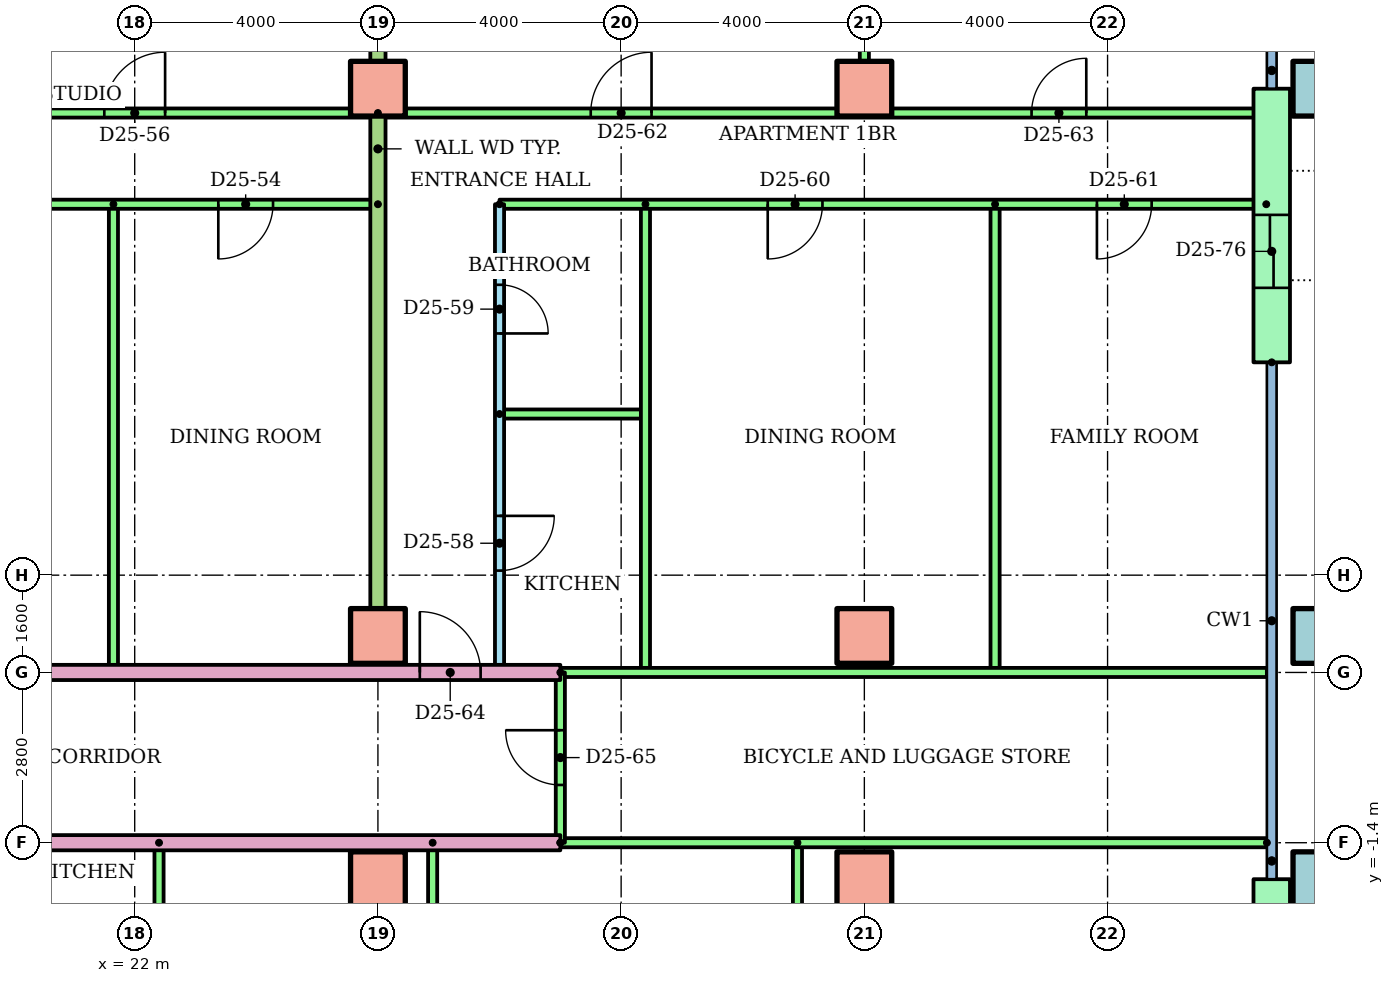
"""IFC4 building model, lengths in metres.
Left out: names, types, materials, properties, quantities, classifications, styles, units other than length and angle.
Written with IfcOpenShell. Run it as: python <this file> out.ifc"""

import sys

from ifc_helpers import new_model, si_unit, direction, frame, frame_2d, origin, origin_2d, place, context, subcontext, project, spatial, rectangle, hollow_rectangle, extrude, element, fill, save


model = new_model("IFC4")
c1 = context("Model", 3, precision=1e-05, world=origin(), true_north=direction((0.0, 1.0)))
c2 = subcontext(c1, "Body", "Model", "MODEL_VIEW")
j1 = project(units=[si_unit("LENGTHUNIT", "METRE"), si_unit("PLANEANGLEUNIT", "RADIAN")], contexts=[c1])
p1 = place(None, origin())
s1 = spatial("IfcSite", under=j1, at=p1, CompositionType="ELEMENT")
p2 = place(p1, origin())
s2 = spatial("IfcBuilding", under=s1, at=p2, CompositionType="ELEMENT")
p3 = place(p2, frame((0.0, 0.0, 96.7)))
s3 = spatial("IfcBuildingStorey", under=s2, at=p3, CompositionType="ELEMENT", Elevation=96.7)
for number, where in (
    (1, (26.0, -2.0, 0.0)),
    (2, (34.0, -2.0, 0.0)),
):
    element("IfcColumn", number, at=place(p3, frame(where)), inside=s3, PredefinedType="COLUMN", context=c2, shape_type="SweptSolid", body=[
        extrude(rectangle(XDim=0.9, YDim=0.9, at=origin_2d()), origin(), (0.0, 0.0, 1.0), 3.2),
    ])
p4 = place(p3, frame((41.5, -2.0, 0.0)))
e3 = element("IfcColumn", 3, at=p4, inside=s3, PredefinedType="COLUMN", context=c2, shape_type="SweptSolid", body=[
    extrude(hollow_rectangle(XDim=0.9, YDim=0.9, WallThickness=0.045, at=origin_2d()), origin(), (0.0, 0.0, 1.0), 3.2),
])
for number, where in (
    (4, (26.0, 2.0, 0.0)),
    (5, (34.0, 2.0, 0.0)),
):
    element("IfcColumn", number, at=place(p3, frame(where)), inside=s3, PredefinedType="COLUMN", context=c2, shape_type="SweptSolid", body=[
        extrude(rectangle(XDim=0.9, YDim=0.9, at=origin_2d()), origin(), (0.0, 0.0, 1.0), 3.2),
    ])
p5 = place(p3, frame((41.5, 2.0, 0.0)))
e6 = element("IfcColumn", 6, at=p5, inside=s3, PredefinedType="COLUMN", context=c2, shape_type="SweptSolid", body=[
    extrude(hollow_rectangle(XDim=0.9, YDim=0.9, WallThickness=0.045, at=origin_2d()), origin(), (0.0, 0.0, 1.0), 3.2),
])
for number, where in (
    (7, (26.0, 11.0, 0.0)),
    (8, (34.0, 11.0, 0.0)),
):
    element("IfcColumn", number, at=place(p3, frame(where)), inside=s3, PredefinedType="COLUMN", context=c2, shape_type="SweptSolid", body=[
        extrude(rectangle(XDim=0.9, YDim=0.9, at=origin_2d()), origin(), (0.0, 0.0, 1.0), 3.2),
    ])
p6 = place(p3, frame((41.5, 11.0, 0.0)))
e9 = element("IfcColumn", 9, at=p6, inside=s3, PredefinedType="COLUMN", context=c2, shape_type="SweptSolid", body=[
    extrude(hollow_rectangle(XDim=0.9, YDim=0.9, WallThickness=0.045, at=origin_2d()), origin(), (0.0, 0.0, 1.0), 3.2),
])
p7 = place(p3, frame((40.7, -5.7, 0.0), z_axis=(0.0, 0.0, 1.0), x_axis=(0.0, 1.0, 0.0)))
e10 = element("IfcWall", 10, at=p7, inside=s3, PredefinedType="STANDARD", context=c2, shape_type="SweptSolid", body=[
    extrude(rectangle(XDim=3.7, YDim=0.6, at=frame_2d((1.85, 0.0))), origin(), (0.0, 0.0, 1.0), 2.92),
])
p8 = place(p7, frame((1.25, 0.0, 0.0)))
e11 = element("IfcOpeningElement", 11, at=p8, cuts=e10, PredefinedType="OPENING", context=c2, shape_type="SweptSolid", body=[
    extrude(rectangle(XDim=1.2, YDim=2.1, at=frame_2d((0.6, 1.05))), frame((0.0, 0.31, 0.0), z_axis=(0.0, -1.0, 0.0), x_axis=(1.0, 0.0, 0.0)), (0.0, 0.0, 1.0), 0.62),
])
p9 = place(p3, frame((40.7, 6.5, 0.0), z_axis=(0.0, 0.0, 1.0), x_axis=(0.0, 1.0, 0.0)))
e12 = element("IfcWall", 12, at=p9, inside=s3, PredefinedType="STANDARD", context=c2, shape_type="SweptSolid", body=[
    extrude(rectangle(XDim=4.5, YDim=0.6, at=frame_2d((2.25, 0.0))), origin(), (0.0, 0.0, 1.0), 2.92),
])
p10 = place(p9, frame((1.225, 0.0, 0.0)))
e13 = element("IfcOpeningElement", 13, at=p10, cuts=e12, PredefinedType="OPENING", context=c2, shape_type="SweptSolid", body=[
    extrude(rectangle(XDim=1.2, YDim=2.1, at=frame_2d((0.6, 1.05))), frame((0.0, 0.31, 0.0), z_axis=(0.0, -1.0, 0.0), x_axis=(1.0, 0.0, 0.0)), (0.0, 0.0, 1.0), 0.62),
])
for number, where, z_axis, x_axis in (
    (14, (22.4, -1.4, 0.0), (0.0, 0.0, 1.0), (0.0, -1.0, 0.0)),
    (15, (26.9, -1.4, 0.0), (0.0, 0.0, 1.0), (0.0, -1.0, 0.0)),
    (16, (32.9, -1.4, 0.0), (0.0, 0.0, 1.0), (0.0, -1.0, 0.0)),
):
    element("IfcWall", number, at=place(p3, frame(where, z_axis=z_axis, x_axis=x_axis)), inside=s3, PredefinedType="PARTITIONING", context=c2, shape_type="SweptSolid", body=[
        extrude(rectangle(XDim=5.3, YDim=0.15, at=frame_2d((2.65, 0.0))), origin(), (0.0, 0.0, 1.0), 2.4),
    ])
p11 = place(p3, frame((29.0, -1.4, 0.0), z_axis=(0.0, 0.0, 1.0), x_axis=(-1.0, 0.0, 0.0)))
e17 = element("IfcWall", 17, at=p11, inside=s3, PredefinedType="PARTITIONING", context=c2, shape_type="SweptSolid", body=[
    extrude(rectangle(XDim=15.0, YDim=0.25, at=frame_2d((7.5, 0.0))), origin(), (0.0, 0.0, 1.0), 2.4),
])
p12 = place(p11, frame((9.311, 0.0, 0.0)))
e18 = element("IfcOpeningElement", 18, at=p12, cuts=e17, PredefinedType="OPENING", context=c2, shape_type="SweptSolid", body=[
    extrude(rectangle(XDim=1.0, YDim=2.1, at=frame_2d((0.5, 1.05))), frame((0.0, 0.135, 0.0), z_axis=(0.0, -1.0, 0.0), x_axis=(1.0, 0.0, 0.0)), (0.0, 0.0, 1.0), 0.27),
])
p13 = place(p3, frame((40.62, -1.4, 0.0), z_axis=(0.0, 0.0, 1.0), x_axis=(-1.0, 0.0, 0.0)))
e19 = element("IfcWall", 19, at=p13, inside=s3, PredefinedType="PARTITIONING", context=c2, shape_type="SweptSolid", body=[
    extrude(rectangle(XDim=11.62, YDim=0.15, at=frame_2d((5.81, 0.0))), origin(), (0.0, 0.0, 1.0), 2.4),
])
p14 = place(p3, frame((21.65, 9.1, 0.0), z_axis=(0.0, 0.0, 1.0), x_axis=(0.0, -1.0, 0.0)))
e20 = element("IfcWall", 20, at=p14, inside=s3, PredefinedType="PARTITIONING", context=c2, shape_type="SweptSolid", body=[
    extrude(rectangle(XDim=7.7, YDim=0.15, at=frame_2d((3.85, 0.0))), origin(), (0.0, 0.0, 1.0), 2.4),
])
p15 = place(p3, frame((26.0, 9.1, 0.0), z_axis=(0.0, 0.0, 1.0), x_axis=(-1.0, 0.0, 0.0)))
e21 = element("IfcWall", 21, at=p15, inside=s3, PredefinedType="PARTITIONING", context=c2, shape_type="SweptSolid", body=[
    extrude(rectangle(XDim=10.0, YDim=0.15, at=frame_2d((5.0, 0.0))), origin(), (0.0, 0.0, 1.0), 2.4),
])
p16 = place(p15, frame((5.525, 0.0, 0.0)))
e22 = element("IfcOpeningElement", 22, at=p16, cuts=e21, PredefinedType="OPENING", context=c2, shape_type="SweptSolid", body=[
    extrude(rectangle(XDim=0.9, YDim=2.1, at=frame_2d((0.45, 1.05))), frame((0.0, 0.085, 0.0), z_axis=(0.0, -1.0, 0.0), x_axis=(1.0, 0.0, 0.0)), (0.0, 0.0, 1.0), 0.17),
])
p17 = place(p15, frame((1.725, 0.0, 0.0)))
e23 = element("IfcOpeningElement", 23, at=p17, cuts=e21, PredefinedType="OPENING", context=c2, shape_type="SweptSolid", body=[
    extrude(rectangle(XDim=0.9, YDim=2.1, at=frame_2d((0.45, 1.05))), frame((0.0, 0.085, 0.0), z_axis=(0.0, -1.0, 0.0), x_axis=(1.0, 0.0, 0.0)), (0.0, 0.0, 1.0), 0.17),
])
p18 = place(p3, frame((14.0, 10.6, 0.0)))
e24 = element("IfcWall", 24, at=p18, inside=s3, PredefinedType="PARTITIONING", context=c2, shape_type="SweptSolid", body=[
    extrude(rectangle(XDim=12.0, YDim=0.15, at=frame_2d((6.0, 0.0))), origin(), (0.0, 0.0, 1.0), 2.4),
])
p19 = place(p18, frame((1.5, 0.0, 0.0)))
e25 = element("IfcOpeningElement", 25, at=p19, cuts=e24, PredefinedType="OPENING", context=c2, shape_type="SweptSolid", body=[
    extrude(rectangle(XDim=1.0, YDim=2.1, at=frame_2d((0.5, 1.05))), frame((0.0, 0.085, 0.0), z_axis=(0.0, -1.0, 0.0), x_axis=(1.0, 0.0, 0.0)), (0.0, 0.0, 1.0), 0.17),
])
p20 = place(p18, frame((7.5, 0.0, 0.0)))
e26 = element("IfcOpeningElement", 26, at=p20, cuts=e24, PredefinedType="OPENING", context=c2, shape_type="SweptSolid", body=[
    extrude(rectangle(XDim=1.0, YDim=2.1, at=frame_2d((0.5, 1.05))), frame((0.0, 0.085, 0.0), z_axis=(0.0, -1.0, 0.0), x_axis=(1.0, 0.0, 0.0)), (0.0, 0.0, 1.0), 0.17),
])
p21 = place(p3, frame((28.0, 9.1, 0.0), z_axis=(0.0, 0.0, 1.0), x_axis=(0.0, -1.0, 0.0)))
e27 = element("IfcWall", 27, at=p21, inside=s3, PredefinedType="PARTITIONING", context=c2, shape_type="SweptSolid", body=[
    extrude(rectangle(XDim=7.7, YDim=0.15, at=frame_2d((3.85, 0.0))), origin(), (0.0, 0.0, 1.0), 2.4),
])
p22 = place(p21, frame((5.125, 0.0, 0.0)))
e28 = element("IfcOpeningElement", 28, at=p22, cuts=e27, PredefinedType="OPENING", context=c2, shape_type="SweptSolid", body=[
    extrude(rectangle(XDim=0.9, YDim=2.1, at=frame_2d((0.45, 1.05))), frame((0.0, 0.085, 0.0), z_axis=(0.0, -1.0, 0.0), x_axis=(1.0, 0.0, 0.0)), (0.0, 0.0, 1.0), 0.17),
])
p23 = place(p21, frame((1.325, 0.0, 0.0)))
e29 = element("IfcOpeningElement", 29, at=p23, cuts=e27, PredefinedType="OPENING", context=c2, shape_type="SweptSolid", body=[
    extrude(rectangle(XDim=0.8, YDim=2.1, at=frame_2d((0.4, 1.05))), frame((0.0, 0.085, 0.0), z_axis=(0.0, -1.0, 0.0), x_axis=(1.0, 0.0, 0.0)), (0.0, 0.0, 1.0), 0.17),
])
p24 = place(p3, frame((28.0, 5.65, 0.0)))
e30 = element("IfcWall", 30, at=p24, inside=s3, PredefinedType="PARTITIONING", context=c2, shape_type="SweptSolid", body=[
    extrude(rectangle(XDim=2.4, YDim=0.15, at=frame_2d((1.2, 0.0))), origin(), (0.0, 0.0, 1.0), 2.4),
])
for number, where, z_axis, x_axis in (
    (31, (30.4, 9.1, 0.0), (0.0, 0.0, 1.0), (0.0, -1.0, 0.0)),
    (32, (36.15, 9.1, 0.0), (0.0, 0.0, 1.0), (0.0, -1.0, 0.0)),
):
    element("IfcWall", number, at=place(p3, frame(where, z_axis=z_axis, x_axis=x_axis)), inside=s3, PredefinedType="PARTITIONING", context=c2, shape_type="SweptSolid", body=[
        extrude(rectangle(XDim=7.7, YDim=0.15, at=frame_2d((3.85, 0.0))), origin(), (0.0, 0.0, 1.0), 2.4),
    ])
p25 = place(p3, frame((40.61, 9.1, 0.0), z_axis=(0.0, 0.0, 1.0), x_axis=(-1.0, 0.0, 0.0)))
e33 = element("IfcWall", 33, at=p25, inside=s3, PredefinedType="PARTITIONING", context=c2, shape_type="SweptSolid", body=[
    extrude(rectangle(XDim=12.61, YDim=0.15, at=frame_2d((6.305, 0.0))), origin(), (0.0, 0.0, 1.0), 2.4),
])
p26 = place(p25, frame((7.299, 0.0, 0.0)))
e34 = element("IfcOpeningElement", 34, at=p26, cuts=e33, PredefinedType="OPENING", context=c2, shape_type="SweptSolid", body=[
    extrude(rectangle(XDim=0.9, YDim=2.1, at=frame_2d((0.45, 1.05))), frame((0.0, 0.085, 0.0), z_axis=(0.0, -1.0, 0.0), x_axis=(1.0, 0.0, 0.0)), (0.0, 0.0, 1.0), 0.17),
])
p27 = place(p25, frame((1.885, 0.0, 0.0)))
e35 = element("IfcOpeningElement", 35, at=p27, cuts=e33, PredefinedType="OPENING", context=c2, shape_type="SweptSolid", body=[
    extrude(rectangle(XDim=0.9, YDim=2.1, at=frame_2d((0.45, 1.05))), frame((0.0, 0.085, 0.0), z_axis=(0.0, -1.0, 0.0), x_axis=(1.0, 0.0, 0.0)), (0.0, 0.0, 1.0), 0.17),
])
p28 = place(p3, frame((26.0, 10.6, 0.0)))
e36 = element("IfcWall", 36, at=p28, inside=s3, PredefinedType="PARTITIONING", context=c2, shape_type="SweptSolid", body=[
    extrude(rectangle(XDim=14.61, YDim=0.15, at=frame_2d((7.305, 0.0))), origin(), (0.0, 0.0, 1.0), 2.4),
])
p29 = place(p28, frame((3.5, 0.0, 0.0)))
e37 = element("IfcOpeningElement", 37, at=p29, cuts=e36, PredefinedType="OPENING", context=c2, shape_type="SweptSolid", body=[
    extrude(rectangle(XDim=1.0, YDim=2.1, at=frame_2d((0.5, 1.05))), frame((0.0, 0.085, 0.0), z_axis=(0.0, -1.0, 0.0), x_axis=(1.0, 0.0, 0.0)), (0.0, 0.0, 1.0), 0.17),
])
p30 = place(p28, frame((10.75, 0.0, 0.0)))
e38 = element("IfcOpeningElement", 38, at=p30, cuts=e36, PredefinedType="OPENING", context=c2, shape_type="SweptSolid", body=[
    extrude(rectangle(XDim=0.9, YDim=2.1, at=frame_2d((0.45, 1.05))), frame((0.0, 0.085, 0.0), z_axis=(0.0, -1.0, 0.0), x_axis=(1.0, 0.0, 0.0)), (0.0, 0.0, 1.0), 0.17),
])
p31 = place(p3, frame((34.0, 18.621, 0.0), z_axis=(0.0, 0.0, 1.0), x_axis=(0.0, -1.0, 0.0)))
e39 = element("IfcWall", 39, at=p31, inside=s3, PredefinedType="PARTITIONING", context=c2, shape_type="SweptSolid", body=[
    extrude(rectangle(XDim=8.021, YDim=0.15, at=frame_2d((4.01, 0.0))), origin(), (0.0, 0.0, 1.0), 2.4),
])
p32 = place(p3, frame((26.0, 18.621, 0.0), z_axis=(0.0, 0.0, 1.0), x_axis=(0.0, -1.0, 0.0)))
e40 = element("IfcWall", 40, at=p32, inside=s3, PredefinedType="PARTITIONING", context=c2, shape_type="SweptSolid", body=[
    extrude(rectangle(XDim=17.221, YDim=0.25, at=frame_2d((8.611, 0.0))), origin(), (0.0, 0.0, 1.0), 2.4),
])
p33 = place(p3, frame((14.0, 1.4, 0.0)))
e41 = element("IfcWall", 41, at=p33, inside=s3, PredefinedType="PARTITIONING", context=c2, shape_type="SweptSolid", body=[
    extrude(rectangle(XDim=15.0, YDim=0.25, at=frame_2d((7.5, 0.0))), origin(), (0.0, 0.0, 1.0), 2.4),
])
p34 = place(p33, frame((0.5, 0.0, 0.0)))
e42 = element("IfcOpeningElement", 42, at=p34, cuts=e41, PredefinedType="OPENING", context=c2, shape_type="SweptSolid", body=[
    extrude(rectangle(XDim=1.0, YDim=2.1, at=frame_2d((0.5, 1.05))), frame((0.0, 0.135, 0.0), z_axis=(0.0, -1.0, 0.0), x_axis=(1.0, 0.0, 0.0)), (0.0, 0.0, 1.0), 0.27),
])
p35 = place(p33, frame((12.689, 0.0, 0.0)))
e43 = element("IfcOpeningElement", 43, at=p35, cuts=e41, PredefinedType="OPENING", context=c2, shape_type="SweptSolid", body=[
    extrude(rectangle(XDim=1.0, YDim=2.1, at=frame_2d((0.5, 1.05))), frame((0.0, 0.135, 0.0), z_axis=(0.0, -1.0, 0.0), x_axis=(1.0, 0.0, 0.0)), (0.0, 0.0, 1.0), 0.27),
])
p36 = place(p3, frame((29.0, 1.4, 0.0)))
e44 = element("IfcWall", 44, at=p36, inside=s3, PredefinedType="PARTITIONING", context=c2, shape_type="SweptSolid", body=[
    extrude(rectangle(XDim=11.62, YDim=0.15, at=frame_2d((5.81, 0.0))), origin(), (0.0, 0.0, 1.0), 2.4),
])
p37 = place(p3, frame((29.0, -1.4, 0.0), z_axis=(0.0, 0.0, 1.0), x_axis=(0.0, 1.0, 0.0)))
e45 = element("IfcWall", 45, at=p37, inside=s3, PredefinedType="PARTITIONING", context=c2, shape_type="SweptSolid", body=[
    extrude(rectangle(XDim=2.8, YDim=0.15, at=frame_2d((1.4, 0.0))), origin(), (0.0, 0.0, 1.0), 2.4),
])
p38 = place(p37, frame((0.95, 0.0, 0.0)))
e46 = element("IfcOpeningElement", 46, at=p38, cuts=e45, PredefinedType="OPENING", context=c2, shape_type="SweptSolid", body=[
    extrude(rectangle(XDim=0.9, YDim=2.1, at=frame_2d((0.45, 1.05))), frame((0.0, 0.085, 0.0), z_axis=(0.0, -1.0, 0.0), x_axis=(1.0, 0.0, 0.0)), (0.0, 0.0, 1.0), 0.17),
])
p39 = place(p17, origin())
e47 = element("IfcDoor", 47, at=p39, inside=s3, OperationType="SINGLE_SWING_RIGHT", PredefinedType="DOOR", context=c2, shape_type="SweptSolid", body=[
    extrude(rectangle(XDim=0.9, YDim=2.1, at=frame_2d((0.45, 1.05))), frame((0.0, 0.025, 0.0), z_axis=(0.0, -1.0, 0.0), x_axis=(1.0, 0.0, 0.0)), (0.0, 0.0, 1.0), 0.05),
])
fill(e23, e47)
p40 = place(p20, origin())
e48 = element("IfcDoor", 48, at=p40, inside=s3, OperationType="SINGLE_SWING_RIGHT", PredefinedType="DOOR", context=c2, shape_type="SweptSolid", body=[
    extrude(rectangle(XDim=1.0, YDim=2.1, at=frame_2d((0.5, 1.05))), frame((0.0, 0.025, 0.0), z_axis=(0.0, -1.0, 0.0), x_axis=(1.0, 0.0, 0.0)), (0.0, 0.0, 1.0), 0.05),
])
fill(e26, e48)
p41 = place(p22, origin())
e49 = element("IfcDoor", 49, at=p41, inside=s3, OperationType="SINGLE_SWING_LEFT", PredefinedType="DOOR", context=c2, shape_type="SweptSolid", body=[
    extrude(rectangle(XDim=0.9, YDim=2.1, at=frame_2d((0.45, 1.05))), frame((0.0, 0.025, 0.0), z_axis=(0.0, -1.0, 0.0), x_axis=(1.0, 0.0, 0.0)), (0.0, 0.0, 1.0), 0.05),
])
fill(e28, e49)
p42 = place(p23, origin())
e50 = element("IfcDoor", 50, at=p42, inside=s3, OperationType="SINGLE_SWING_RIGHT", PredefinedType="DOOR", context=c2, shape_type="SweptSolid", body=[
    extrude(rectangle(XDim=0.8, YDim=2.1, at=frame_2d((0.4, 1.05))), frame((0.0, 0.025, 0.0), z_axis=(0.0, -1.0, 0.0), x_axis=(1.0, 0.0, 0.0)), (0.0, 0.0, 1.0), 0.05),
])
fill(e29, e50)
p43 = place(p26, origin())
e51 = element("IfcDoor", 51, at=p43, inside=s3, OperationType="SINGLE_SWING_RIGHT", PredefinedType="DOOR", context=c2, shape_type="SweptSolid", body=[
    extrude(rectangle(XDim=0.9, YDim=2.1, at=frame_2d((0.45, 1.05))), frame((0.0, 0.025, 0.0), z_axis=(0.0, -1.0, 0.0), x_axis=(1.0, 0.0, 0.0)), (0.0, 0.0, 1.0), 0.05),
])
fill(e34, e51)
p44 = place(p27, origin())
e52 = element("IfcDoor", 52, at=p44, inside=s3, OperationType="SINGLE_SWING_RIGHT", PredefinedType="DOOR", context=c2, shape_type="SweptSolid", body=[
    extrude(rectangle(XDim=0.9, YDim=2.1, at=frame_2d((0.45, 1.05))), frame((0.0, 0.025, 0.0), z_axis=(0.0, -1.0, 0.0), x_axis=(1.0, 0.0, 0.0)), (0.0, 0.0, 1.0), 0.05),
])
fill(e35, e52)
p45 = place(p29, origin())
e53 = element("IfcDoor", 53, at=p45, inside=s3, OperationType="SINGLE_SWING_RIGHT", PredefinedType="DOOR", context=c2, shape_type="SweptSolid", body=[
    extrude(rectangle(XDim=1.0, YDim=2.1, at=frame_2d((0.5, 1.05))), frame((0.0, 0.025, 0.0), z_axis=(0.0, -1.0, 0.0), x_axis=(1.0, 0.0, 0.0)), (0.0, 0.0, 1.0), 0.05),
])
fill(e37, e53)
p46 = place(p30, origin())
e54 = element("IfcDoor", 54, at=p46, inside=s3, OperationType="SINGLE_SWING_RIGHT", PredefinedType="DOOR", context=c2, shape_type="SweptSolid", body=[
    extrude(rectangle(XDim=0.9, YDim=2.1, at=frame_2d((0.45, 1.05))), frame((0.0, 0.025, 0.0), z_axis=(0.0, -1.0, 0.0), x_axis=(1.0, 0.0, 0.0)), (0.0, 0.0, 1.0), 0.05),
])
fill(e38, e54)
p47 = place(p35, origin())
e55 = element("IfcDoor", 55, at=p47, inside=s3, OperationType="SINGLE_SWING_LEFT", PredefinedType="DOOR", context=c2, shape_type="SweptSolid", body=[
    extrude(rectangle(XDim=1.0, YDim=2.1, at=frame_2d((0.5, 1.05))), frame((0.0, 0.025, 0.0), z_axis=(0.0, -1.0, 0.0), x_axis=(1.0, 0.0, 0.0)), (0.0, 0.0, 1.0), 0.05),
])
fill(e43, e55)
p48 = place(p38, origin())
e56 = element("IfcDoor", 56, at=p48, inside=s3, OperationType="SINGLE_SWING_RIGHT", PredefinedType="DOOR", context=c2, shape_type="SweptSolid", body=[
    extrude(rectangle(XDim=0.9, YDim=2.1, at=frame_2d((0.45, 1.05))), frame((0.0, 0.025, 0.0), z_axis=(0.0, -1.0, 0.0), x_axis=(1.0, 0.0, 0.0)), (0.0, 0.0, 1.0), 0.05),
])
fill(e46, e56)
p49 = place(p10, origin())
e57 = element("IfcDoor", 57, at=p49, inside=s3, OperationType="SLIDING_TO_LEFT", PredefinedType="DOOR", context=c2, shape_type="SweptSolid", body=[
    extrude(rectangle(XDim=1.2, YDim=2.1, at=frame_2d((0.6, 1.05))), frame((0.0, 0.025, 0.0), z_axis=(0.0, -1.0, 0.0), x_axis=(1.0, 0.0, 0.0)), (0.0, 0.0, 1.0), 0.05),
])
fill(e13, e57)
save(model, sys.argv[1])
